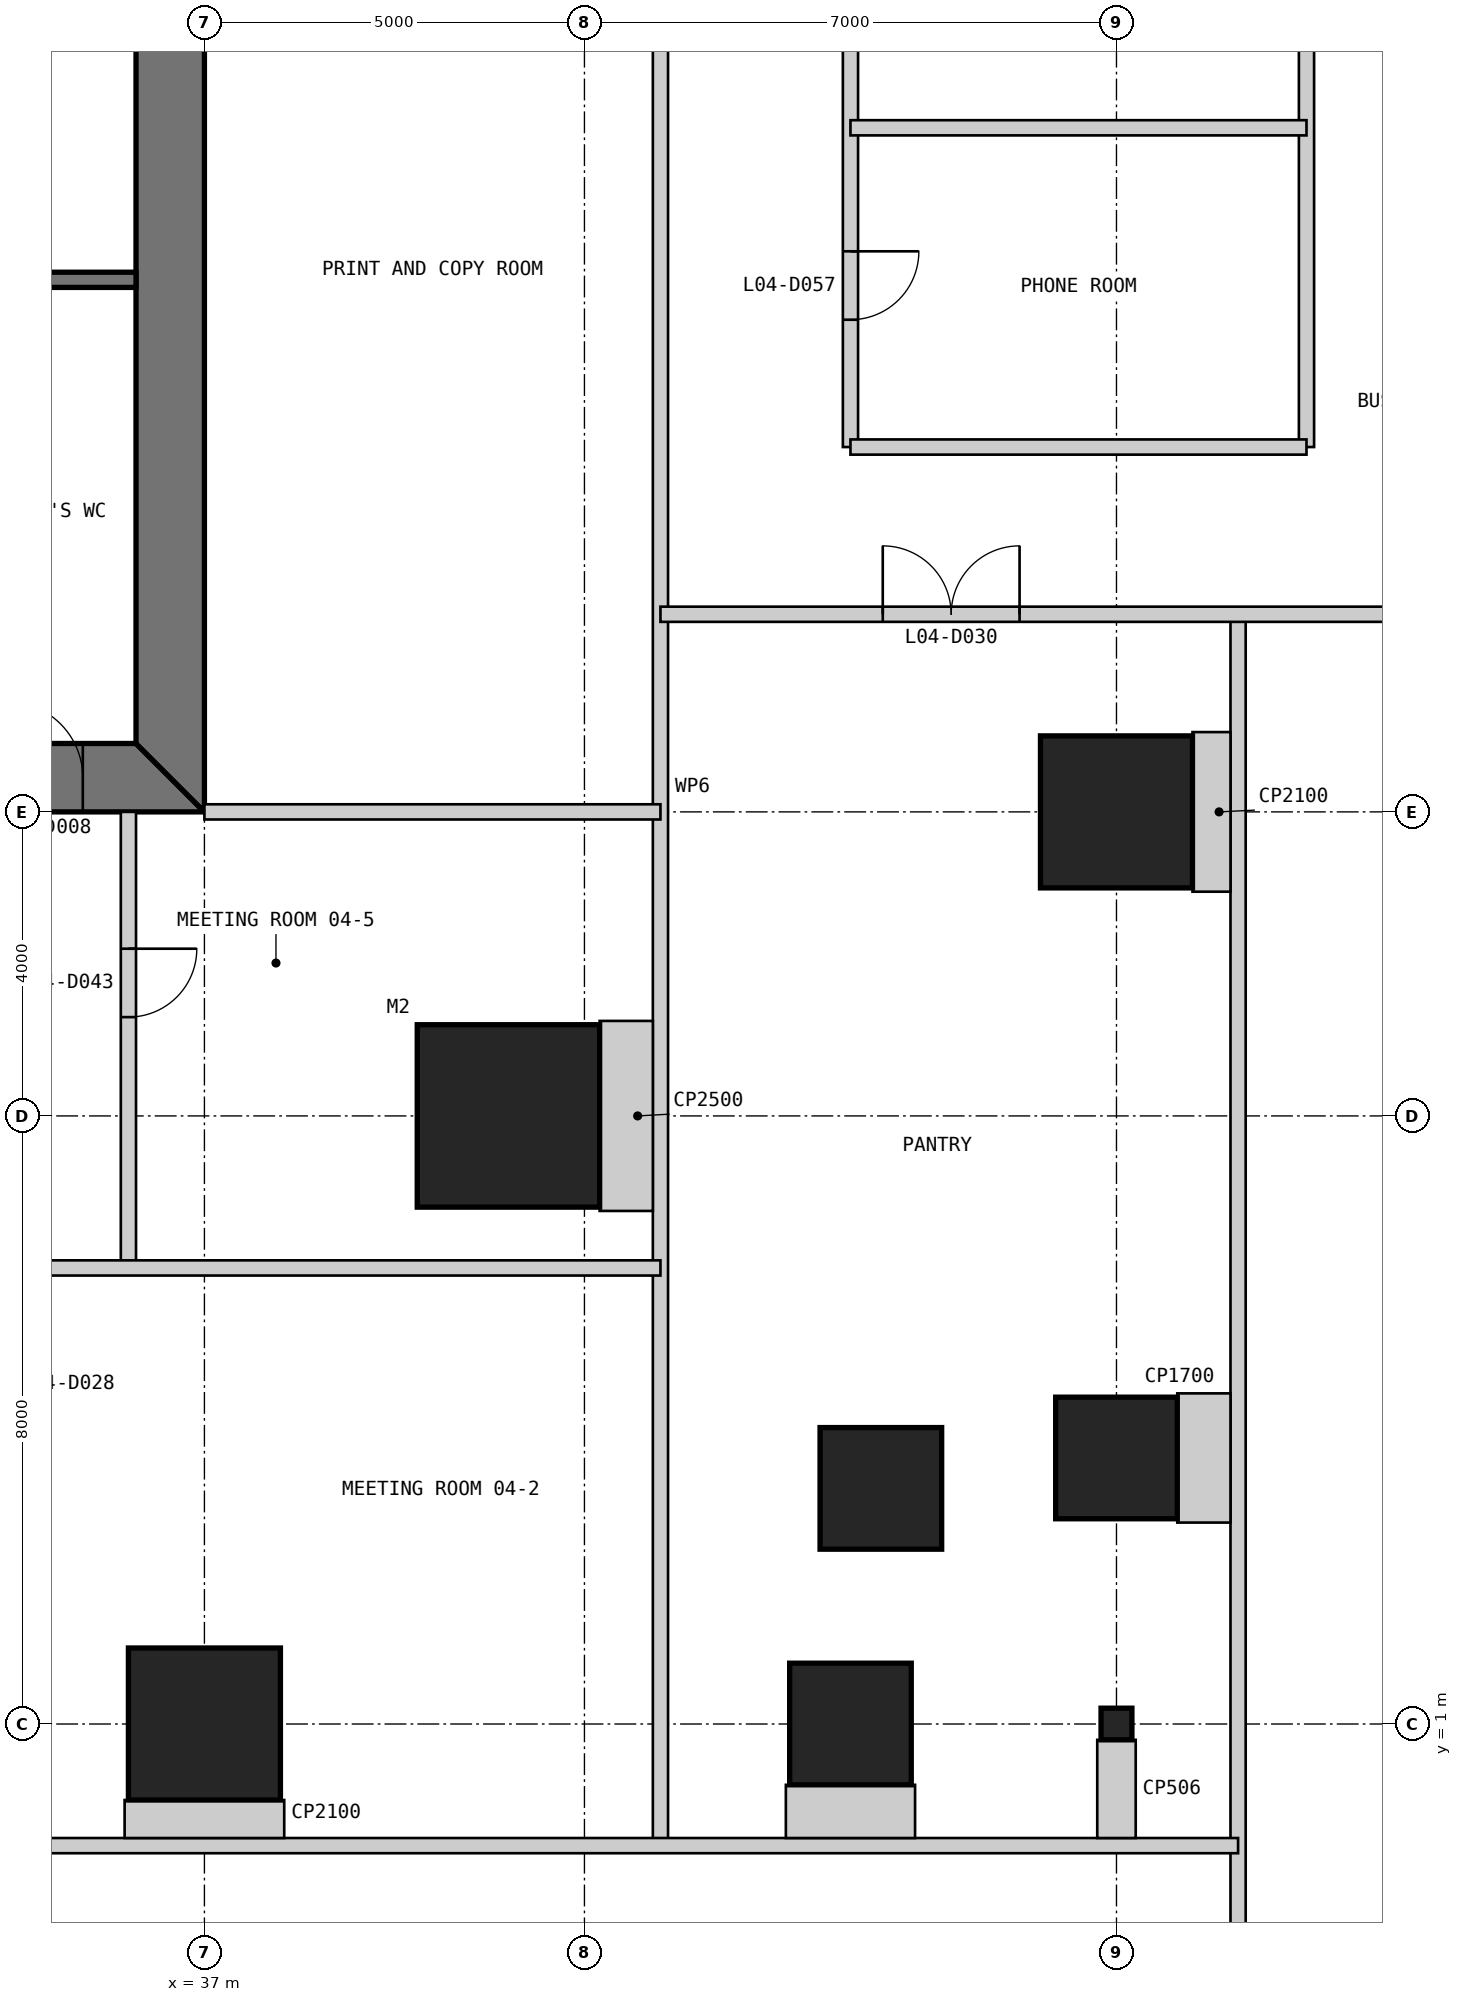
"""IFC4 building model, lengths in metres.
Left out: names, types, materials, properties, quantities, classifications, styles, units other than length and angle.
Written with IfcOpenShell. Run it as: python <this file> out.ifc"""

import sys

from ifc_helpers import new_model, si_unit, direction, frame, frame_2d, origin, origin_2d, place, context, subcontext, project, spatial, polyline, rectangle, i_section, outline, extrude, element, fill, save


model = new_model("IFC4")
c1 = context("Model", 3, precision=1e-05, world=origin(), true_north=direction((0.0, 1.0)))
c2 = subcontext(c1, "Body", "Model", "MODEL_VIEW")
j1 = project(units=[si_unit("LENGTHUNIT", "METRE"), si_unit("PLANEANGLEUNIT", "RADIAN")], contexts=[c1])
p1 = place(None, origin())
s1 = spatial("IfcSite", under=j1, at=p1, CompositionType="ELEMENT")
p2 = place(p1, origin())
s2 = spatial("IfcBuilding", under=s1, at=p2, CompositionType="ELEMENT")
p3 = place(p2, frame((0.0, 0.0, 21.4)))
s3 = spatial("IfcBuildingStorey", under=s2, at=p3, CompositionType="ELEMENT", Elevation=21.4)
p4 = place(p3, frame((41.0, 9.0, 0.0), z_axis=(0.0, 0.0, 1.0), x_axis=(1.0, 0.0, 0.0)))
e1 = element("IfcColumn", 1, at=p4, inside=s3, PredefinedType="COLUMN", context=c2, shape_type="SweptSolid", body=[
    extrude(rectangle(XDim=2.4, YDim=2.4, at=origin_2d()), origin(), (0.0, 0.0, 1.0), 4.8),
])
p5 = place(p3, frame((37.0, 1.0, 0.0), z_axis=(0.0, 0.0, 1.0), x_axis=(1.0, 0.0, 0.0)))
e2 = element("IfcColumn", 2, at=p5, inside=s3, PredefinedType="COLUMN", context=c2, shape_type="SweptSolid", body=[
    extrude(rectangle(XDim=2.0, YDim=2.0, at=origin_2d()), origin(), (0.0, 0.0, 1.0), 4.8),
])
for number, where, z_axis, x_axis in (
    (3, (45.5, 1.0, 0.0), (0.0, 0.0, 1.0), (1.0, 0.0, 0.0)),
    (4, (45.9, 4.1, 0.0), (0.0, 0.0, 1.0), (1.0, 0.0, 0.0)),
    (5, (49.0, 4.5, 0.0), (0.0, 0.0, 1.0), (1.0, 0.0, 0.0)),
):
    element("IfcColumn", number, at=place(p3, frame(where, z_axis=z_axis, x_axis=x_axis)), inside=s3, PredefinedType="COLUMN", context=c2, shape_type="SweptSolid", body=[
        extrude(rectangle(XDim=1.6, YDim=1.6, at=origin_2d()), origin(), (0.0, 0.0, 1.0), 4.8),
    ])
p6 = place(p3, frame((49.0, 13.0, 0.0), z_axis=(0.0, 0.0, 1.0), x_axis=(1.0, 0.0, 0.0)))
e6 = element("IfcColumn", 6, at=p6, inside=s3, PredefinedType="COLUMN", context=c2, shape_type="SweptSolid", body=[
    extrude(rectangle(XDim=2.0, YDim=2.0, at=origin_2d()), origin(), (0.0, 0.0, 1.0), 4.8),
])
p7 = place(p3, frame((49.0, 1.0, 0.0), z_axis=(0.0, 0.0, 1.0), x_axis=(1.0, 0.0, 0.0)))
e7 = element("IfcColumn", 7, at=p7, inside=s3, PredefinedType="COLUMN", context=c2, shape_type="SweptSolid", body=[
    extrude(i_section(OverallWidth=0.406, OverallDepth=0.417, WebThickness=0.03, FlangeThickness=0.048, at=origin_2d()), origin(), (0.0, 0.0, 1.0), 4.8),
])
p8 = place(p3, frame((13.0, 13.45, 0.0), z_axis=(0.0, 0.0, 1.0), x_axis=(1.0, 0.0, 0.0)))
e8 = element("IfcWall", 8, at=p8, inside=s3, PredefinedType="SHEAR", context=c2, shape_type="SweptSolid", body=[
    extrude(outline(polyline([(0.0, -0.45), (24.0, -0.45), (23.1, 0.45), (0.9, 0.45), (0.0, -0.45)])), origin(), (0.0, 0.0, 1.0), 4.8),
])
p9 = place(p8, frame((4.9, 0.0, 0.0)))
e9 = element("IfcOpeningElement", 9, at=p9, cuts=e8, PredefinedType="OPENING", context=c2, shape_type="SweptSolid", body=[
    extrude(rectangle(XDim=1.0, YDim=2.2, at=frame_2d((0.5, 1.1))), frame((0.0, 0.46, 0.0), z_axis=(0.0, -1.0, 0.0), x_axis=(1.0, 0.0, 0.0)), (0.0, 0.0, 1.0), 0.92),
])
p10 = place(p8, frame((8.9, 0.0, 0.0)))
e10 = element("IfcOpeningElement", 10, at=p10, cuts=e8, PredefinedType="OPENING", context=c2, shape_type="SweptSolid", body=[
    extrude(rectangle(XDim=1.1, YDim=2.2, at=frame_2d((0.55, 1.1))), frame((0.0, 0.46, 0.0), z_axis=(0.0, -1.0, 0.0), x_axis=(1.0, 0.0, 0.0)), (0.0, 0.0, 1.0), 0.92),
])
p11 = place(p8, frame((15.05, 0.0, 0.0)))
e11 = element("IfcOpeningElement", 11, at=p11, cuts=e8, PredefinedType="OPENING", context=c2, shape_type="SweptSolid", body=[
    extrude(rectangle(XDim=0.9, YDim=2.2, at=frame_2d((0.45, 1.1))), frame((0.0, 0.46, 0.0), z_axis=(0.0, -1.0, 0.0), x_axis=(1.0, 0.0, 0.0)), (0.0, 0.0, 1.0), 0.92),
])
p12 = place(p8, frame((17.9, 0.0, 0.0)))
e12 = element("IfcOpeningElement", 12, at=p12, cuts=e8, PredefinedType="OPENING", context=c2, shape_type="SweptSolid", body=[
    extrude(rectangle(XDim=1.0, YDim=2.2, at=frame_2d((0.5, 1.1))), frame((0.0, 0.46, 0.0), z_axis=(0.0, -1.0, 0.0), x_axis=(1.0, 0.0, 0.0)), (0.0, 0.0, 1.0), 0.92),
])
p13 = place(p8, frame((21.4, 0.0, 0.0)))
e13 = element("IfcOpeningElement", 13, at=p13, cuts=e8, PredefinedType="OPENING", context=c2, shape_type="SweptSolid", body=[
    extrude(rectangle(XDim=1.0, YDim=2.2, at=frame_2d((0.5, 1.1))), frame((0.0, 0.46, 0.0), z_axis=(0.0, -1.0, 0.0), x_axis=(1.0, 0.0, 0.0)), (0.0, 0.0, 1.0), 0.92),
])
p14 = place(p3, frame((36.55, 13.9, 0.0), z_axis=(0.0, 0.0, 1.0), x_axis=(0.0, 1.0, 0.0)))
e14 = element("IfcWall", 14, at=p14, inside=s3, PredefinedType="SHEAR", context=c2, shape_type="SweptSolid", body=[
    extrude(outline(polyline([(-0.9, -0.45), (23.1, -0.45), (22.2, 0.45), (0.0, 0.45), (-0.9, -0.45)])), origin(), (0.0, 0.0, 1.0), 4.8),
])
p15 = place(p14, frame((20.2, 0.0, 0.0)))
e15 = element("IfcOpeningElement", 15, at=p15, cuts=e14, PredefinedType="OPENING", context=c2, shape_type="SweptSolid", body=[
    extrude(rectangle(XDim=1.0, YDim=2.2, at=frame_2d((0.5, 1.1))), frame((0.0, 0.46, 0.0), z_axis=(0.0, -1.0, 0.0), x_axis=(1.0, 0.0, 0.0)), (0.0, 0.0, 1.0), 0.92),
])
p16 = place(p14, frame((17.25, 0.0, 0.0)))
e16 = element("IfcOpeningElement", 16, at=p16, cuts=e14, PredefinedType="OPENING", context=c2, shape_type="SweptSolid", body=[
    extrude(rectangle(XDim=0.9, YDim=2.2, at=frame_2d((0.45, 1.1))), frame((0.0, 0.46, 0.0), z_axis=(0.0, -1.0, 0.0), x_axis=(1.0, 0.0, 0.0)), (0.0, 0.0, 1.0), 0.92),
])
p17 = place(p3, frame((20.3, 20.0, 0.0), z_axis=(0.0, 0.0, 1.0), x_axis=(1.0, 0.0, 0.0)))
e17 = element("IfcWall", 17, at=p17, inside=s3, PredefinedType="SOLIDWALL", context=c2, shape_type="SweptSolid", body=[
    extrude(rectangle(XDim=15.8, YDim=0.2, at=frame_2d((7.9, 0.0))), origin(), (0.0, 0.0, 1.0), 4.6),
])
p18 = place(p3, frame((36.0, 7.0, 0.0), z_axis=(0.0, 0.0, 1.0), x_axis=(0.0, 1.0, 0.0)))
e18 = element("IfcWall", 18, at=p18, inside=s3, PredefinedType="PARTITIONING", context=c2, shape_type="SweptSolid", body=[
    extrude(rectangle(XDim=6.0, YDim=0.2, at=frame_2d((3.0, 0.0))), origin(), (0.0, 0.0, 1.0), 4.5),
])
p19 = place(p18, frame((3.3, 0.0, 0.0)))
e19 = element("IfcOpeningElement", 19, at=p19, cuts=e18, PredefinedType="OPENING", context=c2, shape_type="SweptSolid", body=[
    extrude(rectangle(XDim=0.9, YDim=2.2, at=frame_2d((0.45, 1.1))), frame((0.0, 0.11, 0.0), z_axis=(0.0, -1.0, 0.0), x_axis=(1.0, 0.0, 0.0)), (0.0, 0.0, 1.0), 0.22),
])
p20 = place(p3, frame((43.0, -0.6, 0.0), z_axis=(0.0, 0.0, 1.0), x_axis=(0.0, 1.0, 0.0)))
e20 = element("IfcWall", 20, at=p20, inside=s3, PredefinedType="PARTITIONING", context=c2, shape_type="SweptSolid", body=[
    extrude(rectangle(XDim=28.6, YDim=0.2, at=frame_2d((14.3, 0.0))), origin(), (0.0, 0.0, 1.0), 3.843),
])
p21 = place(p3, frame((45.5, 17.8, 0.0), z_axis=(0.0, 0.0, 1.0), x_axis=(0.0, 1.0, 0.0)))
e21 = element("IfcWall", 21, at=p21, inside=s3, PredefinedType="PARTITIONING", context=c2, shape_type="SweptSolid", body=[
    extrude(rectangle(XDim=18.0, YDim=0.2, at=frame_2d((9.0, 0.0))), origin(), (0.0, 0.0, 1.0), 4.5),
])
p22 = place(p21, frame((8.3, 0.0, 0.0)))
e22 = element("IfcOpeningElement", 22, at=p22, cuts=e21, PredefinedType="OPENING", context=c2, shape_type="SweptSolid", body=[
    extrude(rectangle(XDim=1.8, YDim=2.4, at=frame_2d((0.9, 1.2))), frame((0.0, 0.11, 0.0), z_axis=(0.0, -1.0, 0.0), x_axis=(1.0, 0.0, 0.0)), (0.0, 0.0, 1.0), 0.22),
])
p23 = place(p21, frame((1.675, 0.0, 0.0)))
e23 = element("IfcOpeningElement", 23, at=p23, cuts=e21, PredefinedType="OPENING", context=c2, shape_type="SweptSolid", body=[
    extrude(rectangle(XDim=0.9, YDim=2.2, at=frame_2d((0.45, 1.1))), frame((0.0, 0.11, 0.0), z_axis=(0.0, -1.0, 0.0), x_axis=(1.0, 0.0, 0.0)), (0.0, 0.0, 1.0), 0.22),
])
p24 = place(p21, frame((15.625, 0.0, 0.0)))
e24 = element("IfcOpeningElement", 24, at=p24, cuts=e21, PredefinedType="OPENING", context=c2, shape_type="SweptSolid", body=[
    extrude(rectangle(XDim=0.9, YDim=2.2, at=frame_2d((0.45, 1.1))), frame((0.0, 0.11, 0.0), z_axis=(0.0, -1.0, 0.0), x_axis=(1.0, 0.0, 0.0)), (0.0, 0.0, 1.0), 0.22),
])
p25 = place(p3, frame((50.6, -7.25, 0.0), z_axis=(0.0, 0.0, 1.0), x_axis=(0.0, 1.0, 0.0)))
e25 = element("IfcWall", 25, at=p25, inside=s3, PredefinedType="PARTITIONING", context=c2, shape_type="SweptSolid", body=[
    extrude(rectangle(XDim=22.85, YDim=0.2, at=frame_2d((11.425, 0.0))), origin(), (0.0, 0.0, 1.0), 4.5),
])
p26 = place(p3, frame((51.5, 17.8, 0.0), z_axis=(0.0, 0.0, 1.0), x_axis=(0.0, 1.0, 0.0)))
e26 = element("IfcWall", 26, at=p26, inside=s3, PredefinedType="PARTITIONING", context=c2, shape_type="SweptSolid", body=[
    extrude(rectangle(XDim=18.0, YDim=0.2, at=frame_2d((9.0, 0.0))), origin(), (0.0, 0.0, 1.0), 4.5),
])
p27 = place(p3, frame((26.4, -0.6, 0.0), z_axis=(0.0, 0.0, 1.0), x_axis=(1.0, 0.0, 0.0)))
e27 = element("IfcWall", 27, at=p27, inside=s3, PredefinedType="PARTITIONING", context=c2, shape_type="SweptSolid", body=[
    extrude(rectangle(XDim=24.2, YDim=0.2, at=frame_2d((12.1, 0.0))), origin(), (0.0, 0.0, 1.0), 4.5),
])
p28 = place(p3, frame((34.4, 7.0, 0.0), z_axis=(0.0, 0.0, 1.0), x_axis=(1.0, 0.0, 0.0)))
e28 = element("IfcWall", 28, at=p28, inside=s3, PredefinedType="PARTITIONING", context=c2, shape_type="SweptSolid", body=[
    extrude(rectangle(XDim=8.6, YDim=0.2, at=frame_2d((4.3, 0.0))), origin(), (0.0, 0.0, 1.0), 4.5),
])
p29 = place(p3, frame((37.0, 13.0, 0.0), z_axis=(0.0, 0.0, 1.0), x_axis=(1.0, 0.0, 0.0)))
e29 = element("IfcWall", 29, at=p29, inside=s3, PredefinedType="PARTITIONING", context=c2, shape_type="SweptSolid", body=[
    extrude(rectangle(XDim=6.0, YDim=0.2, at=frame_2d((3.0, 0.0))), origin(), (0.0, 0.0, 1.0), 3.653),
])
p30 = place(p3, frame((43.0, 15.6, 0.0), z_axis=(0.0, 0.0, 1.0), x_axis=(1.0, 0.0, 0.0)))
e30 = element("IfcWall", 30, at=p30, inside=s3, PredefinedType="PARTITIONING", context=c2, shape_type="SweptSolid", body=[
    extrude(rectangle(XDim=14.25, YDim=0.2, at=frame_2d((7.125, 0.0))), origin(), (0.0, 0.0, 1.0), 4.5),
])
p31 = place(p30, frame((10.0, 0.0, 0.0)))
e31 = element("IfcOpeningElement", 31, at=p31, cuts=e30, PredefinedType="OPENING", context=c2, shape_type="SweptSolid", body=[
    extrude(rectangle(XDim=1.8, YDim=2.4, at=frame_2d((0.9, 1.2))), frame((0.0, 0.11, 0.0), z_axis=(0.0, -1.0, 0.0), x_axis=(1.0, 0.0, 0.0)), (0.0, 0.0, 1.0), 0.22),
])
p32 = place(p30, frame((2.925, 0.0, 0.0)))
e32 = element("IfcOpeningElement", 32, at=p32, cuts=e30, PredefinedType="OPENING", context=c2, shape_type="SweptSolid", body=[
    extrude(rectangle(XDim=1.8, YDim=2.4, at=frame_2d((0.9, 1.2))), frame((0.0, 0.11, 0.0), z_axis=(0.0, -1.0, 0.0), x_axis=(1.0, 0.0, 0.0)), (0.0, 0.0, 1.0), 0.22),
])
for number, where, z_axis, x_axis in (
    (33, (45.5, 17.8, 0.0), (0.0, 0.0, 1.0), (1.0, 0.0, 0.0)),
    (34, (45.5, 22.0, 0.0), (0.0, 0.0, 1.0), (1.0, 0.0, 0.0)),
):
    element("IfcWall", number, at=place(p3, frame(where, z_axis=z_axis, x_axis=x_axis)), inside=s3, PredefinedType="PARTITIONING", context=c2, shape_type="SweptSolid", body=[
        extrude(rectangle(XDim=6.0, YDim=0.2, at=frame_2d((3.0, 0.0))), origin(), (0.0, 0.0, 1.0), 4.5),
    ])
p33 = place(p3, frame((37.0, -0.5, 0.0), z_axis=(0.0, 0.0, 1.0), x_axis=(0.0, 1.0, 0.0)))
e35 = element("IfcWall", 35, at=p33, inside=s3, PredefinedType="PARTITIONING", context=c2, shape_type="SweptSolid", body=[
    extrude(rectangle(XDim=0.5, YDim=2.1, at=frame_2d((0.25, 0.0))), origin(), (0.0, 0.0, 1.0), 4.5),
])
for number, where, z_axis, x_axis in (
    (36, (45.5, -0.5, 0.0), (0.0, 0.0, 1.0), (0.0, 1.0, 0.0)),
    (37, (50.5, 4.5, 0.0), (0.0, 0.0, 1.0), (-1.0, 0.0, 0.0)),
):
    element("IfcWall", number, at=place(p3, frame(where, z_axis=z_axis, x_axis=x_axis)), inside=s3, PredefinedType="PARTITIONING", context=c2, shape_type="SweptSolid", body=[
        extrude(rectangle(XDim=0.7, YDim=1.7, at=frame_2d((0.35, 0.0))), origin(), (0.0, 0.0, 1.0), 4.5),
    ])
p34 = place(p3, frame((50.5, 13.0, 0.0), z_axis=(0.0, 0.0, 1.0), x_axis=(-1.0, 0.0, 0.0)))
e38 = element("IfcWall", 38, at=p34, inside=s3, PredefinedType="PARTITIONING", context=c2, shape_type="SweptSolid", body=[
    extrude(rectangle(XDim=0.5, YDim=2.1, at=frame_2d((0.25, 0.0))), origin(), (0.0, 0.0, 1.0), 4.5),
])
p35 = place(p3, frame((49.0, -0.5, 0.0), z_axis=(0.0, 0.0, 1.0), x_axis=(0.0, 1.0, 0.0)))
e39 = element("IfcWall", 39, at=p35, inside=s3, PredefinedType="PARTITIONING", context=c2, shape_type="SweptSolid", body=[
    extrude(rectangle(XDim=1.292, YDim=0.506, at=frame_2d((0.646, 0.0))), origin(), (0.0, 0.0, 1.0), 3.754),
])
p36 = place(p3, frame((42.9, 9.0, 0.0), z_axis=(0.0, 0.0, 1.0), x_axis=(-1.0, 0.0, 0.0)))
e40 = element("IfcWall", 40, at=p36, inside=s3, PredefinedType="PARTITIONING", context=c2, shape_type="SweptSolid", body=[
    extrude(rectangle(XDim=0.7, YDim=2.5, at=frame_2d((0.35, 0.0))), origin(), (0.0, 0.0, 1.0), 4.5),
])
p37 = place(p13, origin())
e41 = element("IfcDoor", 41, at=p37, inside=s3, OperationType="SINGLE_SWING_LEFT", PredefinedType="DOOR", context=c2, shape_type="SweptSolid", body=[
    extrude(rectangle(XDim=1.0, YDim=2.2, at=frame_2d((0.5, 1.1))), frame((0.0, 0.025, 0.0), z_axis=(0.0, -1.0, 0.0), x_axis=(1.0, 0.0, 0.0)), (0.0, 0.0, 1.0), 0.05),
    extrude(outline(polyline([(0.0, 0.0), (0.04, 0.0), (0.04, 2.16), (0.96, 2.16), (0.96, 0.0), (1.0, 0.0), (1.0, 2.2), (0.0, 2.2), (0.0, 0.0)])), frame((0.0, 0.3, 0.0), z_axis=(0.0, -1.0, 0.0), x_axis=(1.0, 0.0, 0.0)), (0.0, 0.0, 1.0), 0.6),
])
fill(e13, e41)
p38 = place(p32, origin())
e42 = element("IfcDoor", 42, at=p38, inside=s3, OperationType="DOUBLE_DOOR_SINGLE_SWING", PredefinedType="DOOR", context=c2, shape_type="SweptSolid", body=[
    extrude(rectangle(XDim=1.8, YDim=2.4, at=frame_2d((0.9, 1.2))), frame((0.0, 0.025, 0.0), z_axis=(0.0, -1.0, 0.0), x_axis=(1.0, 0.0, 0.0)), (0.0, 0.0, 1.0), 0.05),
])
fill(e32, e42)
p39 = place(p19, frame((0.9, 0.0, 0.0), z_axis=(0.0, 0.0, 1.0), x_axis=(-1.0, 0.0, 0.0)))
e43 = element("IfcDoor", 43, at=p39, inside=s3, OperationType="SINGLE_SWING_LEFT", PredefinedType="DOOR", context=c2, shape_type="SweptSolid", body=[
    extrude(rectangle(XDim=0.9, YDim=2.2, at=frame_2d((0.45, 1.1))), frame((0.0, 0.025, 0.0), z_axis=(0.0, -1.0, 0.0), x_axis=(1.0, 0.0, 0.0)), (0.0, 0.0, 1.0), 0.05),
])
fill(e19, e43)
p40 = place(p23, frame((0.9, 0.0, 0.0), z_axis=(0.0, 0.0, 1.0), x_axis=(-1.0, 0.0, 0.0)))
e44 = element("IfcDoor", 44, at=p40, inside=s3, OperationType="SINGLE_SWING_LEFT", PredefinedType="DOOR", context=c2, shape_type="SweptSolid", body=[
    extrude(rectangle(XDim=0.9, YDim=2.2, at=frame_2d((0.45, 1.1))), frame((0.0, 0.025, 0.0), z_axis=(0.0, -1.0, 0.0), x_axis=(1.0, 0.0, 0.0)), (0.0, 0.0, 1.0), 0.05),
])
fill(e23, e44)
save(model, sys.argv[1])
